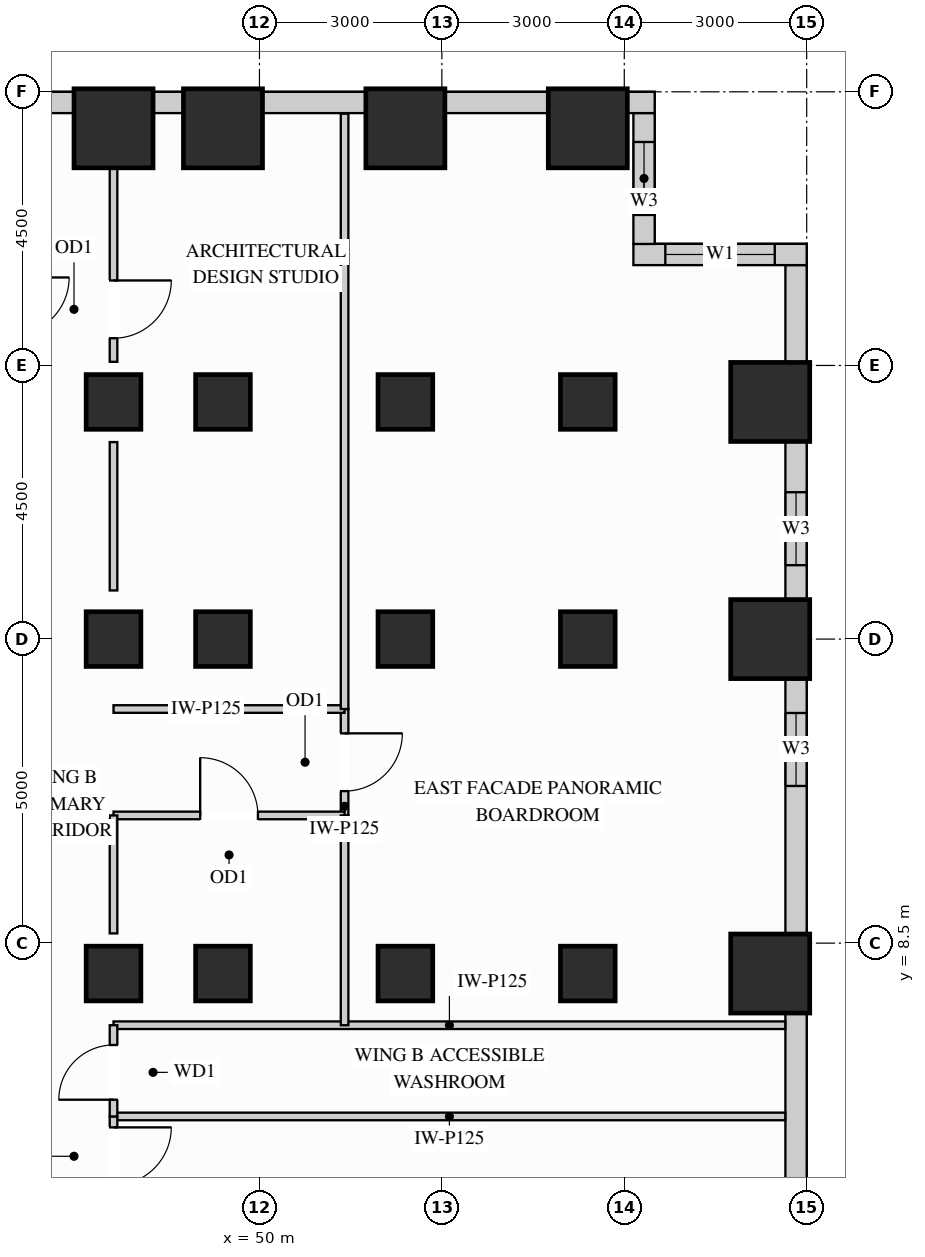
"""IFC4 building model, lengths in metres.
Left out: names, types, materials, properties, quantities, classifications, styles, units other than length and angle.
Written with IfcOpenShell. Run it as: python <this file> out.ifc"""

import sys

from ifc_helpers import new_model, si_unit, direction, frame, frame_2d, origin, origin_2d, place, context, subcontext, project, spatial, rectangle, extrude, source, transform, mapped, element, fill, save


model = new_model("IFC4")
c1 = context("Model", 3, precision=1e-05, world=origin(), true_north=direction((0.0, 1.0)))
c2 = subcontext(c1, "Body", "Model", "MODEL_VIEW")
j1 = project(units=[si_unit("LENGTHUNIT", "METRE"), si_unit("PLANEANGLEUNIT", "RADIAN")], contexts=[c1])
p1 = place(None, origin())
s1 = spatial("IfcSite", under=j1, at=p1, CompositionType="ELEMENT")
p2 = place(p1, origin())
s2 = spatial("IfcBuilding", under=s1, at=p2, CompositionType="ELEMENT")
p3 = place(p2, frame((0.0, 0.0, 47.7)))
s3 = spatial("IfcBuildingStorey", under=s2, at=p3, CompositionType="ELEMENT", Elevation=47.7)
m1 = source(origin(), c2, "Body", "SweptSolid", [
    extrude(rectangle(XDim=0.9, YDim=0.9, at=origin_2d()), origin(), (0.0, 0.0, 1.0), 3.38),
])
for number, where, z_axis, x_axis in (
    (1, (47.6, 13.5, 0.0), (0.0, 0.0, 1.0), (1.0, 0.0, 0.0)),
    (2, (47.6, 8.0, 0.0), (0.0, 0.0, 1.0), (1.0, 0.0, 0.0)),
    (3, (47.6, 17.4, 0.0), (0.0, 0.0, 1.0), (1.0, 0.0, 0.0)),
    (4, (49.4, 13.5, 0.0), (0.0, 0.0, 1.0), (1.0, 0.0, 0.0)),
    (5, (49.4, 17.4, 0.0), (0.0, 0.0, 1.0), (1.0, 0.0, 0.0)),
    (6, (49.4, 8.0, 0.0), (0.0, 0.0, 1.0), (1.0, 0.0, 0.0)),
    (7, (52.4, 13.5, 0.0), (0.0, 0.0, 1.0), (1.0, 0.0, 0.0)),
    (8, (52.4, 17.4, 0.0), (0.0, 0.0, 1.0), (1.0, 0.0, 0.0)),
    (9, (52.4, 8.0, 0.0), (0.0, 0.0, 1.0), (1.0, 0.0, 0.0)),
    (10, (55.4, 13.5, 0.0), (0.0, 0.0, 1.0), (1.0, 0.0, 0.0)),
    (11, (55.4, 17.4, 0.0), (0.0, 0.0, 1.0), (1.0, 0.0, 0.0)),
    (12, (55.4, 8.0, 0.0), (0.0, 0.0, 1.0), (1.0, 0.0, 0.0)),
):
    element("IfcColumn", number, at=place(p3, frame(where, z_axis=z_axis, x_axis=x_axis)), inside=s3, PredefinedType="COLUMN", context=c2, shape_type="MappedRepresentation", body=[
        mapped(m1, transform((0.0, 0.0, 0.0), x_axis=(1.0, 0.0, 0.0), y_axis=(0.0, 1.0, 0.0), z_axis=(0.0, 0.0, 1.0))),
    ])
m2 = source(origin(), c2, "Body", "SweptSolid", [
    extrude(rectangle(XDim=1.3, YDim=1.3, at=origin_2d()), origin(), (0.0, 0.0, 1.0), 3.38),
])
for number, where, z_axis, x_axis in (
    (13, (47.6, 21.9, 0.0), (0.0, 0.0, 1.0), (1.0, 0.0, 0.0)),
    (14, (49.4, 21.9, 0.0), (0.0, 0.0, 1.0), (1.0, 0.0, 0.0)),
    (15, (52.4, 21.9, 0.0), (0.0, 0.0, 1.0), (1.0, 0.0, 0.0)),
    (16, (55.4, 21.9, 0.0), (0.0, 0.0, 1.0), (1.0, 0.0, 0.0)),
    (17, (58.4, 13.5, 0.0), (0.0, 0.0, 1.0), (1.0, 0.0, 0.0)),
    (18, (58.4, 17.4, 0.0), (0.0, 0.0, 1.0), (1.0, 0.0, 0.0)),
    (19, (58.4, 8.0, 0.0), (0.0, 0.0, 1.0), (1.0, 0.0, 0.0)),
):
    element("IfcColumn", number, at=place(p3, frame(where, z_axis=z_axis, x_axis=x_axis)), inside=s3, PredefinedType="COLUMN", context=c2, shape_type="MappedRepresentation", body=[
        mapped(m2, transform((0.0, 0.0, 0.0), x_axis=(1.0, 0.0, 0.0), y_axis=(0.0, 1.0, 0.0), z_axis=(0.0, 0.0, 1.0))),
    ])
m3 = source(origin(), c2, "Body", "SweptSolid", [
    extrude(rectangle(XDim=3.204, YDim=0.35, at=frame_2d((1.602, 0.0))), origin(), (0.0, 0.0, 1.0), 2.51),
])
p4 = place(p3, frame((58.825, 4.148, 0.0), z_axis=(0.0, 0.0, 1.0), x_axis=(0.0, 1.0, 0.0)))
e20 = element("IfcWall", 20, at=p4, inside=s3, PredefinedType="SOLIDWALL", context=c2, shape_type="MappedRepresentation", body=[
    mapped(m3, transform((0.0, 0.0, 0.0), x_axis=(1.0, 0.0, 0.0), y_axis=(0.0, 1.0, 0.0), z_axis=(0.0, 0.0, 1.0))),
])
p5 = place(p3, frame((58.825, 8.648, 0.0), z_axis=(0.0, 0.0, 1.0), x_axis=(0.0, 1.0, 0.0)))
e21 = element("IfcWall", 21, at=p5, inside=s3, PredefinedType="SOLIDWALL", context=c2, shape_type="SweptSolid", body=[
    extrude(rectangle(XDim=4.204, YDim=0.35, at=frame_2d((2.102, 0.0))), origin(), (0.0, 0.0, 1.0), 2.51),
])
p6 = place(p5, frame((2.437, 0.0, 0.78)))
e22 = element("IfcOpeningElement", 22, at=p6, cuts=e21, PredefinedType="OPENING", context=c2, shape_type="SweptSolid", body=[
    extrude(rectangle(XDim=1.2, YDim=1.55, at=frame_2d((0.6, 0.775))), frame((0.0, 0.185, 0.0), z_axis=(0.0, -1.0, 0.0), x_axis=(1.0, 0.0, 0.0)), (0.0, 0.0, 1.0), 0.37),
])
p7 = place(p3, frame((58.825, 14.148, 0.0), z_axis=(0.0, 0.0, 1.0), x_axis=(0.0, 1.0, 0.0)))
e23 = element("IfcWall", 23, at=p7, inside=s3, PredefinedType="SOLIDWALL", context=c2, shape_type="SweptSolid", body=[
    extrude(rectangle(XDim=2.604, YDim=0.35, at=frame_2d((1.302, 0.0))), origin(), (0.0, 0.0, 1.0), 2.51),
])
p8 = place(p7, frame((0.567, 0.0, 0.78)))
e24 = element("IfcOpeningElement", 24, at=p8, cuts=e23, PredefinedType="OPENING", context=c2, shape_type="SweptSolid", body=[
    extrude(rectangle(XDim=1.2, YDim=1.55, at=frame_2d((0.6, 0.775))), frame((0.0, 0.185, 0.0), z_axis=(0.0, -1.0, 0.0), x_axis=(1.0, 0.0, 0.0)), (0.0, 0.0, 1.0), 0.37),
])
m4 = source(origin(), c2, "Body", "SweptSolid", [
    extrude(rectangle(XDim=1.604, YDim=0.35, at=frame_2d((0.802, 0.0))), origin(), (0.0, 0.0, 1.0), 3.365),
])
p9 = place(p3, frame((58.825, 18.048, 0.0), z_axis=(0.0, 0.0, 1.0), x_axis=(0.0, 1.0, 0.0)))
e25 = element("IfcWall", 25, at=p9, inside=s3, PredefinedType="SOLIDWALL", context=c2, shape_type="MappedRepresentation", body=[
    mapped(m4, transform((0.0, 0.0, 0.0), x_axis=(1.0, 0.0, 0.0), y_axis=(0.0, 1.0, 0.0), z_axis=(0.0, 0.0, 1.0))),
])
p10 = place(p3, frame((59.0, 19.825, 0.0), z_axis=(0.0, 0.0, 1.0), x_axis=(-1.0, 0.0, 0.0)))
e26 = element("IfcWall", 26, at=p10, inside=s3, PredefinedType="SOLIDWALL", context=c2, shape_type="SweptSolid", body=[
    extrude(rectangle(XDim=2.85, YDim=0.35, at=frame_2d((1.425, 0.0))), origin(), (0.0, 0.0, 1.0), 3.365),
])
p11 = place(p10, frame((0.525, 0.0, 0.78)))
e27 = element("IfcOpeningElement", 27, at=p11, cuts=e26, PredefinedType="OPENING", context=c2, shape_type="SweptSolid", body=[
    extrude(rectangle(XDim=1.8, YDim=2.1, at=frame_2d((0.9, 1.05))), frame((0.0, 0.185, 0.0), z_axis=(0.0, -1.0, 0.0), x_axis=(1.0, 0.0, 0.0)), (0.0, 0.0, 1.0), 0.37),
])
p12 = place(p3, frame((56.325, 19.998, 0.0), z_axis=(0.0, 0.0, 1.0), x_axis=(0.0, 1.0, 0.0)))
e28 = element("IfcWall", 28, at=p12, inside=s3, PredefinedType="SOLIDWALL", context=c2, shape_type="SweptSolid", body=[
    extrude(rectangle(XDim=2.154, YDim=0.35, at=frame_2d((1.077, 0.0))), origin(), (0.0, 0.0, 1.0), 3.365),
])
p13 = place(p12, frame((0.477, 0.0, 0.78)))
e29 = element("IfcOpeningElement", 29, at=p13, cuts=e28, PredefinedType="OPENING", context=c2, shape_type="SweptSolid", body=[
    extrude(rectangle(XDim=1.2, YDim=2.1, at=frame_2d((0.6, 1.05))), frame((0.0, 0.185, 0.0), z_axis=(0.0, -1.0, 0.0), x_axis=(1.0, 0.0, 0.0)), (0.0, 0.0, 1.0), 0.37),
])
m5 = source(origin(), c2, "Body", "SweptSolid", [
    extrude(rectangle(XDim=0.452, YDim=0.35, at=frame_2d((0.226, 0.0))), origin(), (0.0, 0.0, 1.0), 3.365),
])
p14 = place(p3, frame((56.5, 22.325, 0.0), z_axis=(0.0, 0.0, 1.0), x_axis=(-1.0, 0.0, 0.0)))
e30 = element("IfcWall", 30, at=p14, inside=s3, PredefinedType="SOLIDWALL", context=c2, shape_type="MappedRepresentation", body=[
    mapped(m5, transform((0.0, 0.0, 0.0), x_axis=(1.0, 0.0, 0.0), y_axis=(0.0, 1.0, 0.0), z_axis=(0.0, 0.0, 1.0))),
])
m6 = source(origin(), c2, "Body", "SweptSolid", [
    extrude(rectangle(XDim=1.704, YDim=0.35, at=frame_2d((0.852, 0.0))), origin(), (0.0, 0.0, 1.0), 2.51),
])
for number, where, z_axis, x_axis in (
    (31, (54.752, 22.325, 0.0), (0.0, 0.0, 1.0), (-1.0, 0.0, 0.0)),
    (32, (51.752, 22.325, 0.0), (0.0, 0.0, 1.0), (-1.0, 0.0, 0.0)),
):
    element("IfcWall", number, at=place(p3, frame(where, z_axis=z_axis, x_axis=x_axis)), inside=s3, PredefinedType="SOLIDWALL", context=c2, shape_type="MappedRepresentation", body=[
        mapped(m6, transform((0.0, 0.0, 0.0), x_axis=(1.0, 0.0, 0.0), y_axis=(0.0, 1.0, 0.0), z_axis=(0.0, 0.0, 1.0))),
    ])
m7 = source(origin(), c2, "Body", "SweptSolid", [
    extrude(rectangle(XDim=0.504, YDim=0.35, at=frame_2d((0.252, 0.0))), origin(), (0.0, 0.0, 1.0), 3.365),
])
p15 = place(p3, frame((48.752, 22.325, 0.0), z_axis=(0.0, 0.0, 1.0), x_axis=(-1.0, 0.0, 0.0)))
e33 = element("IfcWall", 33, at=p15, inside=s3, PredefinedType="SOLIDWALL", context=c2, shape_type="MappedRepresentation", body=[
    mapped(m7, transform((0.0, 0.0, 0.0), x_axis=(1.0, 0.0, 0.0), y_axis=(0.0, 1.0, 0.0), z_axis=(0.0, 0.0, 1.0))),
])
p16 = place(p3, frame((46.952, 22.325, 0.0), z_axis=(0.0, 0.0, 1.0), x_axis=(-1.0, 0.0, 0.0)))
e34 = element("IfcWall", 34, at=p16, inside=s3, PredefinedType="SOLIDWALL", context=c2, shape_type="SweptSolid", body=[
    extrude(rectangle(XDim=6.304, YDim=0.35, at=frame_2d((3.152, 0.0))), origin(), (0.0, 0.0, 1.0), 2.51),
])
p17 = place(p16, frame((1.649, 0.0, 0.78)))
e35 = element("IfcOpeningElement", 35, at=p17, cuts=e34, PredefinedType="OPENING", context=c2, shape_type="SweptSolid", body=[
    extrude(rectangle(XDim=1.8, YDim=1.55, at=frame_2d((0.9, 0.775))), frame((0.0, 0.185, 0.0), z_axis=(0.0, -1.0, 0.0), x_axis=(1.0, 0.0, 0.0)), (0.0, 0.0, 1.0), 0.37),
])
p18 = place(p16, frame((3.817, 0.0, 0.78)))
e36 = element("IfcOpeningElement", 36, at=p18, cuts=e34, PredefinedType="OPENING", context=c2, shape_type="SweptSolid", body=[
    extrude(rectangle(XDim=1.8, YDim=1.55, at=frame_2d((0.9, 0.775))), frame((0.0, 0.185, 0.0), z_axis=(0.0, -1.0, 0.0), x_axis=(1.0, 0.0, 0.0)), (0.0, 0.0, 1.0), 0.37),
])
p19 = place(p3, frame((51.4, 10.6, 0.0), z_axis=(0.0, 0.0, 1.0), x_axis=(0.0, 1.0, 0.0)))
e37 = element("IfcWall", 37, at=p19, inside=s3, PredefinedType="PARTITIONING", context=c2, shape_type="SweptSolid", body=[
    extrude(rectangle(XDim=1.75, YDim=0.125, at=frame_2d((0.875, 0.0))), origin(), (0.0, 0.0, 1.0), 3.365),
])
p20 = place(p19, frame((0.4, 0.0, 0.0)))
e38 = element("IfcOpeningElement", 38, at=p20, cuts=e37, PredefinedType="OPENING", context=c2, shape_type="SweptSolid", body=[
    extrude(rectangle(XDim=0.95, YDim=2.15, at=frame_2d((0.475, 1.075))), frame((0.0, 0.073, 0.0), z_axis=(0.0, -1.0, 0.0), x_axis=(1.0, 0.0, 0.0)), (0.0, 0.0, 1.0), 0.145),
])
m8 = source(origin(), c2, "Body", "SweptSolid", [
    extrude(rectangle(XDim=11.048, YDim=0.125, at=frame_2d((5.524, 0.0))), origin(), (0.0, 0.0, 1.0), 3.365),
])
for number, where, z_axis, x_axis in (
    (39, (47.6, 5.65, 0.0), (0.0, 0.0, 1.0), (1.0, 0.0, 0.0)),
    (40, (47.6, 7.15, 0.0), (0.0, 0.0, 1.0), (1.0, 0.0, 0.0)),
):
    element("IfcWall", number, at=place(p3, frame(where, z_axis=z_axis, x_axis=x_axis)), inside=s3, PredefinedType="PARTITIONING", context=c2, shape_type="MappedRepresentation", body=[
        mapped(m8, transform((0.0, 0.0, 0.0), x_axis=(1.0, 0.0, 0.0), y_axis=(0.0, 1.0, 0.0), z_axis=(0.0, 0.0, 1.0))),
    ])
m9 = source(origin(), c2, "Body", "SweptSolid", [
    extrude(rectangle(XDim=3.8, YDim=0.125, at=frame_2d((1.9, 0.0))), origin(), (0.0, 0.0, 1.0), 3.365),
])
p21 = place(p3, frame((47.6, 12.35, 0.0), z_axis=(0.0, 0.0, 1.0), x_axis=(1.0, 0.0, 0.0)))
e41 = element("IfcWall", 41, at=p21, inside=s3, PredefinedType="PARTITIONING", context=c2, shape_type="MappedRepresentation", body=[
    mapped(m9, transform((0.0, 0.0, 0.0), x_axis=(1.0, 0.0, 0.0), y_axis=(0.0, 1.0, 0.0), z_axis=(0.0, 0.0, 1.0))),
])
p22 = place(p3, frame((47.6, 10.6, 0.0), z_axis=(0.0, 0.0, 1.0), x_axis=(1.0, 0.0, 0.0)))
e42 = element("IfcWall", 42, at=p22, inside=s3, PredefinedType="PARTITIONING", context=c2, shape_type="SweptSolid", body=[
    extrude(rectangle(XDim=3.8, YDim=0.125, at=frame_2d((1.9, 0.0))), origin(), (0.0, 0.0, 1.0), 2.67),
])
p23 = place(p22, frame((1.425, 0.0, 0.0)))
e43 = element("IfcOpeningElement", 43, at=p23, cuts=e42, PredefinedType="OPENING", context=c2, shape_type="SweptSolid", body=[
    extrude(rectangle(XDim=0.95, YDim=2.15, at=frame_2d((0.475, 1.075))), frame((0.0, 0.073, 0.0), z_axis=(0.0, -1.0, 0.0), x_axis=(1.0, 0.0, 0.0)), (0.0, 0.0, 1.0), 0.145),
])
m10 = source(origin(), c2, "Body", "SweptSolid", [
    extrude(rectangle(XDim=3.45, YDim=0.125, at=frame_2d((1.725, 0.0))), origin(), (0.0, 0.0, 1.0), 3.365),
])
p24 = place(p3, frame((51.4, 7.15, 0.0), z_axis=(0.0, 0.0, 1.0), x_axis=(0.0, 1.0, 0.0)))
e44 = element("IfcWall", 44, at=p24, inside=s3, PredefinedType="PARTITIONING", context=c2, shape_type="MappedRepresentation", body=[
    mapped(m10, transform((0.0, 0.0, 0.0), x_axis=(1.0, 0.0, 0.0), y_axis=(0.0, 1.0, 0.0), z_axis=(0.0, 0.0, 1.0))),
])
m11 = source(origin(), c2, "Body", "SweptSolid", [
    extrude(rectangle(XDim=9.79, YDim=0.125, at=frame_2d((4.895, 0.0))), origin(), (0.0, 0.0, 1.0), 3.365),
])
p25 = place(p3, frame((51.4, 12.35, 0.0), z_axis=(0.0, 0.0, 1.0), x_axis=(0.0, 1.0, 0.0)))
e45 = element("IfcWall", 45, at=p25, inside=s3, PredefinedType="PARTITIONING", context=c2, shape_type="MappedRepresentation", body=[
    mapped(m11, transform((0.0, 0.0, 0.0), x_axis=(1.0, 0.0, 0.0), y_axis=(0.0, 1.0, 0.0), z_axis=(0.0, 0.0, 1.0))),
])
p26 = place(p3, frame((47.6, 4.16, 0.0), z_axis=(0.0, 0.0, 1.0), x_axis=(0.0, 1.0, 0.0)))
e46 = element("IfcWall", 46, at=p26, inside=s3, PredefinedType="PARTITIONING", context=c2, shape_type="SweptSolid", body=[
    extrude(rectangle(XDim=1.49, YDim=0.125, at=frame_2d((0.745, 0.0))), origin(), (0.0, 0.0, 1.0), 2.67),
])
p27 = place(p26, frame((0.36, 0.0, 0.0)))
e47 = element("IfcOpeningElement", 47, at=p27, cuts=e46, PredefinedType="OPENING", context=c2, shape_type="SweptSolid", body=[
    extrude(rectangle(XDim=0.95, YDim=2.15, at=frame_2d((0.475, 1.075))), frame((0.0, 0.073, 0.0), z_axis=(0.0, -1.0, 0.0), x_axis=(1.0, 0.0, 0.0)), (0.0, 0.0, 1.0), 0.145),
])
m12 = source(origin(), c2, "Body", "SweptSolid", [
    extrude(rectangle(XDim=1.94, YDim=0.125, at=frame_2d((0.97, 0.0))), origin(), (0.0, 0.0, 1.0), 2.67),
])
p28 = place(p3, frame((47.6, 8.66, 0.0), z_axis=(0.0, 0.0, 1.0), x_axis=(0.0, 1.0, 0.0)))
e48 = element("IfcWall", 48, at=p28, inside=s3, PredefinedType="PARTITIONING", context=c2, shape_type="MappedRepresentation", body=[
    mapped(m12, transform((0.0, 0.0, 0.0), x_axis=(1.0, 0.0, 0.0), y_axis=(0.0, 1.0, 0.0), z_axis=(0.0, 0.0, 1.0))),
])
m13 = source(origin(), c2, "Body", "SweptSolid", [
    extrude(rectangle(XDim=2.44, YDim=0.125, at=frame_2d((1.22, 0.0))), origin(), (0.0, 0.0, 1.0), 2.67),
])
p29 = place(p3, frame((47.6, 14.3, 0.0), z_axis=(0.0, 0.0, 1.0), x_axis=(0.0, 1.0, 0.0)))
e49 = element("IfcWall", 49, at=p29, inside=s3, PredefinedType="PARTITIONING", context=c2, shape_type="MappedRepresentation", body=[
    mapped(m13, transform((0.0, 0.0, 0.0), x_axis=(1.0, 0.0, 0.0), y_axis=(0.0, 1.0, 0.0), z_axis=(0.0, 0.0, 1.0))),
])
p30 = place(p3, frame((47.6, 18.06, 0.0), z_axis=(0.0, 0.0, 1.0), x_axis=(0.0, 1.0, 0.0)))
e50 = element("IfcWall", 50, at=p30, inside=s3, PredefinedType="PARTITIONING", context=c2, shape_type="SweptSolid", body=[
    extrude(rectangle(XDim=3.18, YDim=0.125, at=frame_2d((1.59, 0.0))), origin(), (0.0, 0.0, 1.0), 2.67),
])
p31 = place(p30, frame((0.388, 0.0, 0.0)))
e51 = element("IfcOpeningElement", 51, at=p31, cuts=e50, PredefinedType="OPENING", context=c2, shape_type="SweptSolid", body=[
    extrude(rectangle(XDim=0.95, YDim=2.15, at=frame_2d((0.475, 1.075))), frame((0.0, 0.073, 0.0), z_axis=(0.0, -1.0, 0.0), x_axis=(1.0, 0.0, 0.0)), (0.0, 0.0, 1.0), 0.145),
])
p32 = place(p3, frame((47.6, 5.65, 0.0), z_axis=(0.0, 0.0, 1.0), x_axis=(0.0, 1.0, 0.0)))
e52 = element("IfcWall", 52, at=p32, inside=s3, PredefinedType="PARTITIONING", context=c2, shape_type="SweptSolid", body=[
    extrude(rectangle(XDim=1.5, YDim=0.125, at=frame_2d((0.75, 0.0))), origin(), (0.0, 0.0, 1.0), 2.67),
])
p33 = place(p32, frame((0.275, 0.0, 0.0)))
e53 = element("IfcOpeningElement", 53, at=p33, cuts=e52, PredefinedType="OPENING", context=c2, shape_type="SweptSolid", body=[
    extrude(rectangle(XDim=0.9, YDim=2.15, at=frame_2d((0.45, 1.075))), frame((0.0, 0.073, 0.0), z_axis=(0.0, -1.0, 0.0), x_axis=(1.0, 0.0, 0.0)), (0.0, 0.0, 1.0), 0.145),
])
m14 = source(origin(), c2, "Body", "SweptSolid", [
    extrude(rectangle(XDim=0.95, YDim=2.15, at=frame_2d((0.475, 1.075))), frame((0.0, 0.025, 0.0), z_axis=(0.0, -1.0, 0.0), x_axis=(1.0, 0.0, 0.0)), (0.0, 0.0, 1.0), 0.05),
])
p34 = place(p27, origin())
e54 = element("IfcDoor", 54, at=p34, inside=s3, OperationType="SINGLE_SWING_RIGHT", PredefinedType="DOOR", context=c2, shape_type="MappedRepresentation", body=[
    mapped(m14, transform((0.0, 0.0, 0.0), x_axis=(1.0, 0.0, 0.0), y_axis=(0.0, 1.0, 0.0), z_axis=(0.0, 0.0, 1.0))),
])
fill(e47, e54)
p35 = place(p23, origin())
e55 = element("IfcDoor", 55, at=p35, inside=s3, OperationType="SINGLE_SWING_LEFT", PredefinedType="DOOR", context=c2, shape_type="MappedRepresentation", body=[
    mapped(m14, transform((0.0, 0.0, 0.0), x_axis=(1.0, 0.0, 0.0), y_axis=(0.0, 1.0, 0.0), z_axis=(0.0, 0.0, 1.0))),
])
fill(e43, e55)
p36 = place(p20, origin())
e56 = element("IfcDoor", 56, at=p36, inside=s3, OperationType="SINGLE_SWING_RIGHT", PredefinedType="DOOR", context=c2, shape_type="MappedRepresentation", body=[
    mapped(m14, transform((0.0, 0.0, 0.0), x_axis=(1.0, 0.0, 0.0), y_axis=(0.0, 1.0, 0.0), z_axis=(0.0, 0.0, 1.0))),
])
fill(e38, e56)
p37 = place(p31, origin())
e57 = element("IfcDoor", 57, at=p37, inside=s3, OperationType="SINGLE_SWING_RIGHT", PredefinedType="DOOR", context=c2, shape_type="MappedRepresentation", body=[
    mapped(m14, transform((0.0, 0.0, 0.0), x_axis=(1.0, 0.0, 0.0), y_axis=(0.0, 1.0, 0.0), z_axis=(0.0, 0.0, 1.0))),
])
fill(e51, e57)
m15 = source(origin(), c2, "Body", "SweptSolid", [
    extrude(rectangle(XDim=0.9, YDim=2.15, at=frame_2d((0.45, 1.075))), frame((0.0, 0.025, 0.0), z_axis=(0.0, -1.0, 0.0), x_axis=(1.0, 0.0, 0.0)), (0.0, 0.0, 1.0), 0.05),
])
p38 = place(p33, origin())
e58 = element("IfcDoor", 58, at=p38, inside=s3, OperationType="SINGLE_SWING_LEFT", PredefinedType="DOOR", context=c2, shape_type="MappedRepresentation", body=[
    mapped(m15, transform((0.0, 0.0, 0.0), x_axis=(1.0, 0.0, 0.0), y_axis=(0.0, 1.0, 0.0), z_axis=(0.0, 0.0, 1.0))),
])
fill(e53, e58)
m16 = source(origin(), c2, "Body", "SweptSolid", [
    extrude(rectangle(XDim=1.8, YDim=2.1, at=frame_2d((0.9, 1.05))), frame((0.0, 0.03, 0.0), z_axis=(0.0, -1.0, 0.0), x_axis=(1.0, 0.0, 0.0)), (0.0, 0.0, 1.0), 0.06),
])
p39 = place(p11, origin())
e59 = element("IfcWindow", 59, at=p39, inside=s3, PartitioningType="SINGLE_PANEL", PredefinedType="WINDOW", context=c2, shape_type="MappedRepresentation", body=[
    mapped(m16, transform((0.0, 0.0, 0.0), x_axis=(1.0, 0.0, 0.0), y_axis=(0.0, 1.0, 0.0), z_axis=(0.0, 0.0, 1.0))),
])
fill(e27, e59)
m17 = source(origin(), c2, "Body", "SweptSolid", [
    extrude(rectangle(XDim=1.2, YDim=1.55, at=frame_2d((0.6, 0.775))), frame((0.0, 0.03, 0.0), z_axis=(0.0, -1.0, 0.0), x_axis=(1.0, 0.0, 0.0)), (0.0, 0.0, 1.0), 0.06),
])
p40 = place(p6, origin())
e60 = element("IfcWindow", 60, at=p40, inside=s3, PartitioningType="SINGLE_PANEL", PredefinedType="WINDOW", context=c2, shape_type="MappedRepresentation", body=[
    mapped(m17, transform((0.0, 0.0, 0.0), x_axis=(1.0, 0.0, 0.0), y_axis=(0.0, 1.0, 0.0), z_axis=(0.0, 0.0, 1.0))),
])
fill(e22, e60)
p41 = place(p8, origin())
e61 = element("IfcWindow", 61, at=p41, inside=s3, PartitioningType="SINGLE_PANEL", PredefinedType="WINDOW", context=c2, shape_type="MappedRepresentation", body=[
    mapped(m17, transform((0.0, 0.0, 0.0), x_axis=(1.0, 0.0, 0.0), y_axis=(0.0, 1.0, 0.0), z_axis=(0.0, 0.0, 1.0))),
])
fill(e24, e61)
m18 = source(origin(), c2, "Body", "SweptSolid", [
    extrude(rectangle(XDim=1.2, YDim=2.1, at=frame_2d((0.6, 1.05))), frame((0.0, 0.03, 0.0), z_axis=(0.0, -1.0, 0.0), x_axis=(1.0, 0.0, 0.0)), (0.0, 0.0, 1.0), 0.06),
])
p42 = place(p13, origin())
e62 = element("IfcWindow", 62, at=p42, inside=s3, PartitioningType="SINGLE_PANEL", PredefinedType="WINDOW", context=c2, shape_type="MappedRepresentation", body=[
    mapped(m18, transform((0.0, 0.0, 0.0), x_axis=(1.0, 0.0, 0.0), y_axis=(0.0, 1.0, 0.0), z_axis=(0.0, 0.0, 1.0))),
])
fill(e29, e62)
save(model, sys.argv[1])
